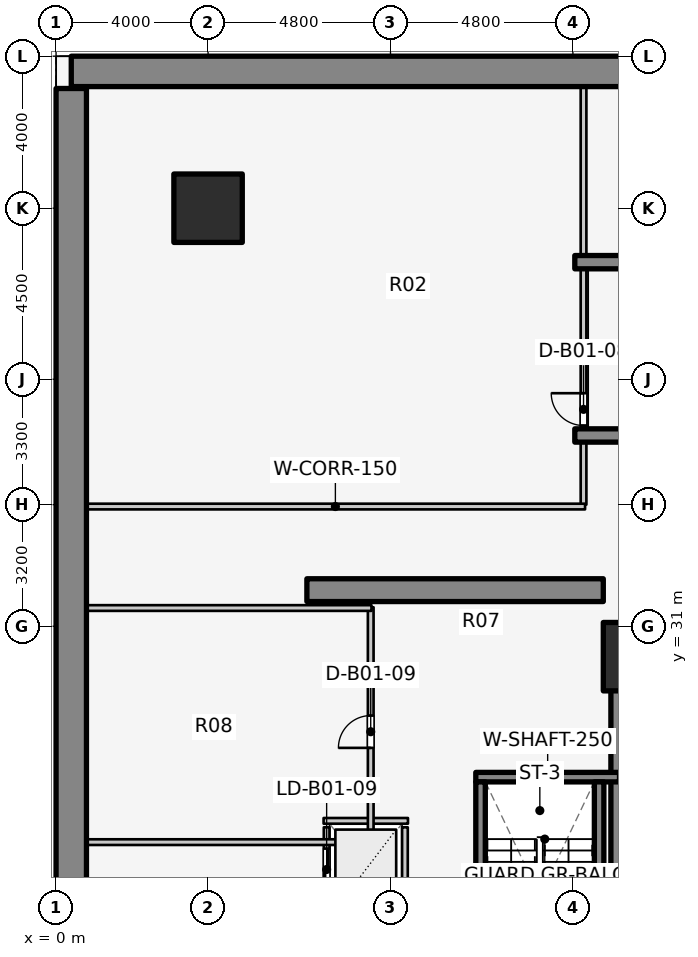
"""IFC4 building model, lengths in metres.
Left out: names, types, materials, properties, quantities, classifications, styles, units other than length and angle.
Written with IfcOpenShell. Run it as: python <this file> out.ifc"""

import sys

from ifc_helpers import new_model, si_unit, direction, frame, frame_2d, origin, origin_2d, place, context, subcontext, project, spatial, rectangle, extrude, element, fill, save


model = new_model("IFC4")
c1 = context("Model", 3, precision=1e-05, world=origin(), true_north=direction((0.0, 1.0)))
c2 = subcontext(c1, "Body", "Model", "MODEL_VIEW")
j1 = project(units=[si_unit("LENGTHUNIT", "METRE"), si_unit("PLANEANGLEUNIT", "RADIAN")], contexts=[c1])
p1 = place(None, origin())
s1 = spatial("IfcSite", under=j1, at=p1, CompositionType="ELEMENT")
p2 = place(p1, origin())
s2 = spatial("IfcBuilding", under=s1, at=p2, CompositionType="ELEMENT")
p3 = place(p2, frame((0.0, 0.0, -5.4)))
s3 = spatial("IfcBuildingStorey", under=s2, at=p3, CompositionType="ELEMENT", Elevation=-5.4)
p4 = place(p3, frame((63.6, 45.6, 0.0), z_axis=(0.0, 0.0, 1.0), x_axis=(-1.0, 0.0, 0.0)))
e1 = element("IfcWall", 1, at=p4, inside=s3, PredefinedType="USERDEFINED", context=c2, shape_type="SweptSolid", body=[
    extrude(rectangle(XDim=63.2, YDim=0.8, at=frame_2d((31.6, 0.0))), origin(), (0.0, 0.0, 1.0), 5.4),
])
p5 = place(p3, frame((0.4, 45.15, 0.0), z_axis=(0.0, 0.0, 1.0), x_axis=(0.0, -1.0, 0.0)))
e2 = element("IfcWall", 2, at=p5, inside=s3, PredefinedType="USERDEFINED", context=c2, shape_type="SweptSolid", body=[
    extrude(rectangle(XDim=29.55, YDim=0.8, at=frame_2d((14.775, 0.0))), origin(), (0.0, 0.0, 1.0), 5.4),
])
p6 = place(p3, frame((6.6, 31.95, 0.0), z_axis=(0.0, 0.0, 1.0), x_axis=(1.0, 0.0, 0.0)))
e3 = element("IfcWall", 3, at=p6, inside=s3, PredefinedType="SOLIDWALL", context=c2, shape_type="SweptSolid", body=[
    extrude(rectangle(XDim=7.8, YDim=0.6, at=frame_2d((3.9, 0.0))), origin(), (0.0, 0.0, 1.0), 5.4),
])
p7 = place(p3, frame((15.05, 17.05, 0.0), z_axis=(0.0, 0.0, 1.0), x_axis=(0.0, 1.0, 0.0)))
e4 = element("IfcWall", 4, at=p7, inside=s3, PredefinedType="SHEAR", context=c2, shape_type="SweptSolid", body=[
    extrude(rectangle(XDim=12.8, YDim=0.9, at=frame_2d((6.4, 0.0))), origin(), (0.0, 0.0, 1.0), 5.4),
])
p8 = place(p3, frame((11.045, 27.03, 0.0), z_axis=(0.0, 0.0, 1.0), x_axis=(1.0, 0.0, 0.0)))
e5 = element("IfcWall", 5, at=p8, inside=s3, PredefinedType="SOLIDWALL", context=c2, shape_type="SweptSolid", body=[
    extrude(rectangle(XDim=3.782, YDim=0.25, at=frame_2d((1.891, 0.0))), origin(), (0.0, 0.0, 1.0), 5.4),
])
for number, where, z_axis, x_axis in (
    (6, (11.17, 19.095, 0.0), (0.0, 0.0, 1.0), (0.0, 1.0, 0.0)),
    (7, (14.29, 19.095, 0.0), (0.0, 0.0, 1.0), (0.0, 1.0, 0.0)),
):
    element("IfcWall", number, at=place(p3, frame(where, z_axis=z_axis, x_axis=x_axis)), inside=s3, PredefinedType="SOLIDWALL", context=c2, shape_type="SweptSolid", body=[
        extrude(rectangle(XDim=7.81, YDim=0.25, at=frame_2d((3.905, 0.0))), origin(), (0.0, 0.0, 1.0), 5.4),
    ])
for number, where, z_axis, x_axis in (
    (8, (13.65, 36.02, 0.0), (0.0, 0.0, 1.0), (1.0, 0.0, 0.0)),
    (9, (13.65, 40.58, 0.0), (0.0, 0.0, 1.0), (1.0, 0.0, 0.0)),
):
    element("IfcWall", number, at=place(p3, frame(where, z_axis=z_axis, x_axis=x_axis)), inside=s3, PredefinedType="SOLIDWALL", context=c2, shape_type="SweptSolid", body=[
        extrude(rectangle(XDim=44.53, YDim=0.35, at=frame_2d((22.265, 0.0))), origin(), (0.0, 0.0, 1.0), 5.4),
    ])
for number, where, z_axis, x_axis in (
    (10, (15.3, 30.2, 0.0), (0.0, 0.0, 1.0), (1.0, 0.0, 0.0)),
    (11, (4.0, 42.0, 0.0), (0.0, 0.0, 1.0), (1.0, 0.0, 0.0)),
):
    element("IfcColumn", number, at=place(p3, frame(where, z_axis=z_axis, x_axis=x_axis)), inside=s3, PredefinedType="COLUMN", context=c2, shape_type="SweptSolid", body=[
        extrude(rectangle(XDim=1.8, YDim=1.8, at=origin_2d()), origin(), (0.0, 0.0, 1.0), 5.4),
    ])
p9 = place(p3, frame((7.12, 23.49, 0.0), z_axis=(0.0, 0.0, 1.0), x_axis=(0.0, 1.0, 0.0)))
e12 = element("IfcWall", 12, at=p9, inside=s3, PredefinedType="SOLIDWALL", context=c2, shape_type="SweptSolid", body=[
    extrude(rectangle(XDim=2.22, YDim=0.15, at=frame_2d((1.11, 0.0))), origin(), (0.0, 0.0, 1.0), 5.055),
])
p10 = place(p9, frame((0.56, 0.0, 0.0)))
e13 = element("IfcOpeningElement", 13, at=p10, cuts=e12, PredefinedType="OPENING", context=c2, shape_type="SweptSolid", body=[
    extrude(rectangle(XDim=1.1, YDim=2.1, at=frame_2d((0.55, 1.05))), frame((0.0, 0.085, 0.0), z_axis=(0.0, -1.0, 0.0), x_axis=(1.0, 0.0, 0.0)), (0.0, 0.0, 1.0), 0.17),
])
for number, where, z_axis, x_axis in (
    (14, (9.18, 23.49, 0.0), (0.0, 0.0, 1.0), (0.0, 1.0, 0.0)),
    (15, (7.04, 25.88, 0.0), (0.0, 0.0, 1.0), (1.0, 0.0, 0.0)),
):
    element("IfcWall", number, at=place(p3, frame(where, z_axis=z_axis, x_axis=x_axis)), inside=s3, PredefinedType="SOLIDWALL", context=c2, shape_type="SweptSolid", body=[
        extrude(rectangle(XDim=2.22, YDim=0.15, at=frame_2d((1.11, 0.0))), origin(), (0.0, 0.0, 1.0), 5.055),
    ])
p11 = place(p3, frame((13.88, 34.2, 0.0), z_axis=(0.0, 0.0, 1.0), x_axis=(0.0, 1.0, 0.0)))
e16 = element("IfcWall", 16, at=p11, inside=s3, PredefinedType="PARTITIONING", context=c2, shape_type="SweptSolid", body=[
    extrude(rectangle(XDim=11.02, YDim=0.15, at=frame_2d((5.51, 0.0))), origin(), (0.0, 0.0, 1.0), 4.1),
])
p12 = place(p11, frame((2.082, 0.0, 0.0)))
e17 = element("IfcOpeningElement", 17, at=p12, cuts=e16, PredefinedType="OPENING", context=c2, shape_type="SweptSolid", body=[
    extrude(rectangle(XDim=0.85, YDim=2.05, at=frame_2d((0.425, 1.025))), frame((0.0, 0.085, 0.0), z_axis=(0.0, -1.0, 0.0), x_axis=(1.0, 0.0, 0.0)), (0.0, 0.0, 1.0), 0.17),
])
p13 = place(p3, frame((0.78, 34.15, 0.0), z_axis=(0.0, 0.0, 1.0), x_axis=(1.0, 0.0, 0.0)))
e18 = element("IfcWall", 18, at=p13, inside=s3, PredefinedType="PARTITIONING", context=c2, shape_type="SweptSolid", body=[
    extrude(rectangle(XDim=13.14, YDim=0.15, at=frame_2d((6.57, 0.0))), origin(), (0.0, 0.0, 1.0), 4.1),
])
p14 = place(p3, frame((8.28, 25.3, 0.0), z_axis=(0.0, 0.0, 1.0), x_axis=(0.0, 1.0, 0.0)))
e19 = element("IfcWall", 19, at=p14, inside=s3, PredefinedType="PARTITIONING", context=c2, shape_type="SweptSolid", body=[
    extrude(rectangle(XDim=6.2, YDim=0.15, at=frame_2d((3.1, 0.0))), origin(), (0.0, 0.0, 1.0), 5.055),
])
p15 = place(p14, frame((2.5, 0.0, 0.0)))
e20 = element("IfcOpeningElement", 20, at=p15, cuts=e19, PredefinedType="OPENING", context=c2, shape_type="SweptSolid", body=[
    extrude(rectangle(XDim=0.85, YDim=2.05, at=frame_2d((0.425, 1.025))), frame((0.0, 0.085, 0.0), z_axis=(0.0, -1.0, 0.0), x_axis=(1.0, 0.0, 0.0)), (0.0, 0.0, 1.0), 0.17),
])
for number, where, z_axis, x_axis in (
    (21, (0.78, 25.32, 0.0), (0.0, 0.0, 1.0), (1.0, 0.0, 0.0)),
    (22, (0.78, 31.48, 0.0), (0.0, 0.0, 1.0), (1.0, 0.0, 0.0)),
):
    element("IfcWall", number, at=place(p3, frame(where, z_axis=z_axis, x_axis=x_axis)), inside=s3, PredefinedType="PARTITIONING", context=c2, shape_type="SweptSolid", body=[
        extrude(rectangle(XDim=7.52, YDim=0.15, at=frame_2d((3.76, 0.0))), origin(), (0.0, 0.0, 1.0), 4.1),
    ])
p16 = place(p10, origin())
e23 = element("IfcDoor", 23, at=p16, inside=s3, OperationType="DOUBLE_DOOR_SLIDING", PredefinedType="DOOR", context=c2, shape_type="SweptSolid", body=[
    extrude(rectangle(XDim=1.1, YDim=2.1, at=frame_2d((0.55, 1.05))), frame((0.0, 0.025, 0.0), z_axis=(0.0, -1.0, 0.0), x_axis=(1.0, 0.0, 0.0)), (0.0, 0.0, 1.0), 0.05),
])
fill(e13, e23)
p17 = place(p12, origin())
e24 = element("IfcDoor", 24, at=p17, inside=s3, OperationType="SINGLE_SWING_RIGHT", PredefinedType="DOOR", context=c2, shape_type="SweptSolid", body=[
    extrude(rectangle(XDim=0.85, YDim=2.05, at=frame_2d((0.425, 1.025))), frame((0.0, 0.025, 0.0), z_axis=(0.0, -1.0, 0.0), x_axis=(1.0, 0.0, 0.0)), (0.0, 0.0, 1.0), 0.05),
])
fill(e17, e24)
p18 = place(p15, origin())
e25 = element("IfcDoor", 25, at=p18, inside=s3, OperationType="SINGLE_SWING_LEFT", PredefinedType="DOOR", context=c2, shape_type="SweptSolid", body=[
    extrude(rectangle(XDim=0.85, YDim=2.05, at=frame_2d((0.425, 1.025))), frame((0.0, 0.025, 0.0), z_axis=(0.0, -1.0, 0.0), x_axis=(1.0, 0.0, 0.0)), (0.0, 0.0, 1.0), 0.05),
])
fill(e20, e25)
save(model, sys.argv[1])
